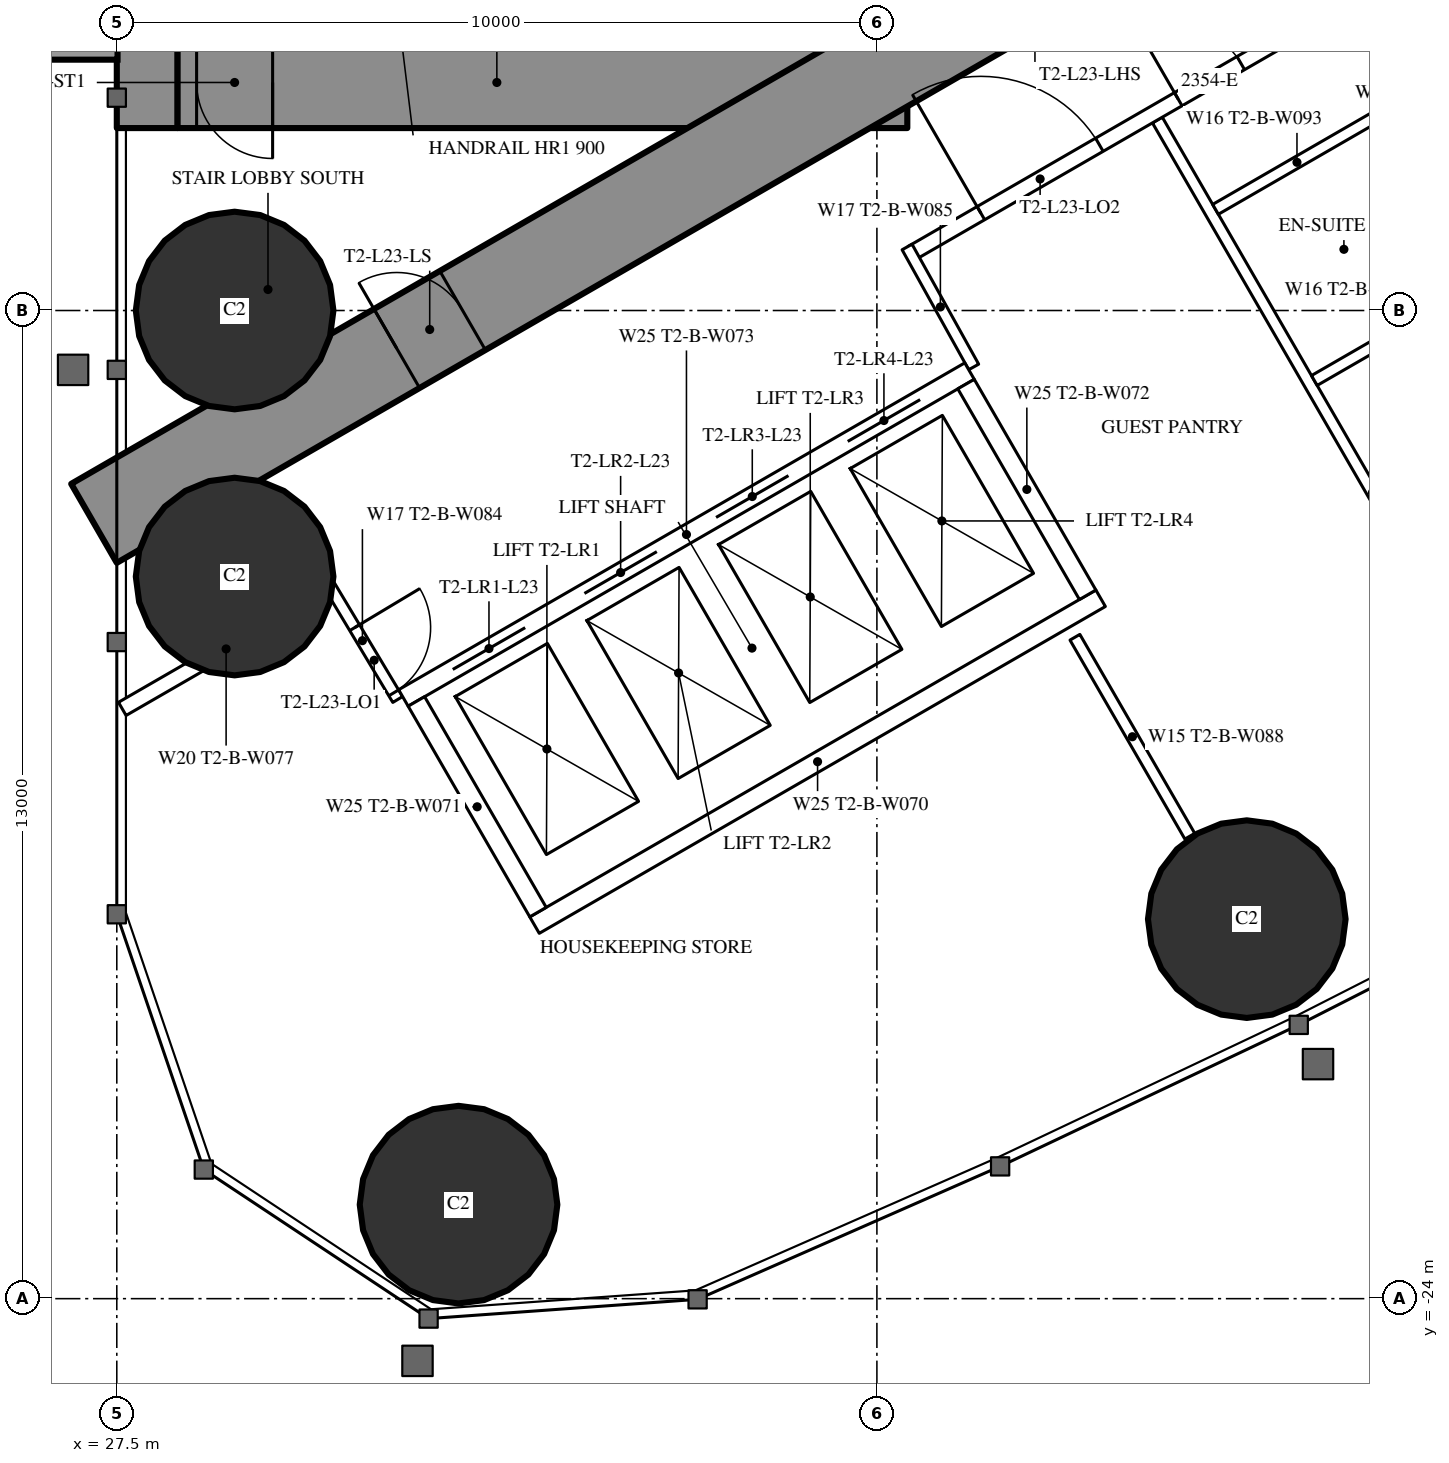
"""IFC4 building model, lengths in metres.
Left out: names, types, materials, properties, quantities, classifications, styles, units other than length and angle.
Written with IfcOpenShell. Run it as: python <this file> out.ifc"""

import sys

from ifc_helpers import new_model, si_unit, direction, frame, frame_2d, origin, origin_2d, place, context, subcontext, project, spatial, rectangle, hollow_circle, extrude, element, fill, save


model = new_model("IFC4")
c1 = context("Model", 3, precision=1e-05, world=origin(), true_north=direction((0.0, 1.0)))
c2 = subcontext(c1, "Body", "Model", "MODEL_VIEW")
j1 = project(units=[si_unit("LENGTHUNIT", "METRE"), si_unit("PLANEANGLEUNIT", "RADIAN")], contexts=[c1])
p1 = place(None, origin())
s1 = spatial("IfcSite", under=j1, at=p1, CompositionType="ELEMENT")
p2 = place(p1, origin())
s2 = spatial("IfcBuilding", under=s1, at=p2, CompositionType="ELEMENT")
p3 = place(p2, frame((0.0, 0.0, 90.6)))
s3 = spatial("IfcBuildingStorey", under=s2, at=p3, CompositionType="ELEMENT", Elevation=90.6)
for number, where, z_axis, x_axis in (
    (1, (31.996, -22.763, 0.0), (0.0, 0.0, 1.0), (1.0, 0.0, 0.0)),
    (2, (29.05, -11.0, 0.0), (0.0, 0.0, 1.0), (1.0, 0.0, 0.0)),
    (3, (29.05, -14.5, 0.0), (0.0, 0.0, 1.0), (1.0, 0.0, 0.0)),
    (4, (42.366, -19.007, 0.0), (0.0, 0.0, 1.0), (1.0, 0.0, 0.0)),
):
    element("IfcColumn", number, at=place(p3, frame(where, z_axis=z_axis, x_axis=x_axis)), inside=s3, PredefinedType="COLUMN", context=c2, shape_type="SweptSolid", body=[
        extrude(hollow_circle(Radius=1.3, WallThickness=0.1, at=origin_2d()), origin(), (0.0, 0.0, 1.0), 3.5),
    ])
p4 = place(p3, frame((27.9, -8.6, 0.0), z_axis=(0.0, 0.0, 1.0), x_axis=(0.0, 1.0, 0.0)))
e5 = element("IfcWall", 5, at=p4, inside=s3, PredefinedType="SHEAR", context=c2, shape_type="SweptSolid", body=[
    extrude(rectangle(XDim=17.2, YDim=0.8, at=frame_2d((8.6, 0.0))), origin(), (0.0, 0.0, 1.0), 3.5),
])
p5 = place(p4, frame((2.45, 0.0, 0.6)))
e6 = element("IfcOpeningElement", 6, at=p5, cuts=e5, PredefinedType="OPENING", context=c2, shape_type="SweptSolid", body=[
    extrude(rectangle(XDim=0.6, YDim=2.1, at=frame_2d((0.3, 1.05))), frame((0.0, 0.41, 0.0), z_axis=(0.0, -1.0, 0.0), x_axis=(1.0, 0.0, 0.0)), (0.0, 0.0, 1.0), 0.82),
])
p6 = place(p4, frame((14.15, 0.0, 0.6)))
e7 = element("IfcOpeningElement", 7, at=p6, cuts=e5, PredefinedType="OPENING", context=c2, shape_type="SweptSolid", body=[
    extrude(rectangle(XDim=0.6, YDim=2.1, at=frame_2d((0.3, 1.05))), frame((0.0, 0.41, 0.0), z_axis=(0.0, -1.0, 0.0), x_axis=(1.0, 0.0, 0.0)), (0.0, 0.0, 1.0), 0.82),
])
p7 = place(p3, frame((37.3, -8.6, 0.0), z_axis=(0.0, 0.0, 1.0), x_axis=(0.0, 1.0, 0.0)))
e8 = element("IfcWall", 8, at=p7, inside=s3, PredefinedType="SHEAR", context=c2, shape_type="SweptSolid", body=[
    extrude(rectangle(XDim=17.2, YDim=1.2, at=frame_2d((8.6, 0.0))), origin(), (0.0, 0.0, 1.0), 3.5),
])
p8 = place(p7, frame((7.7, 0.0, 0.0)))
e9 = element("IfcOpeningElement", 9, at=p8, cuts=e8, PredefinedType="OPENING", context=c2, shape_type="SweptSolid", body=[
    extrude(rectangle(XDim=1.8, YDim=2.2, at=frame_2d((0.9, 1.1))), frame((0.0, 0.61, 0.0), z_axis=(0.0, -1.0, 0.0), x_axis=(1.0, 0.0, 0.0)), (0.0, 0.0, 1.0), 1.22),
])
p9 = place(p3, frame((28.3, -8.0, 0.0), z_axis=(0.0, 0.0, 1.0), x_axis=(1.0, 0.0, 0.0)))
e10 = element("IfcWall", 10, at=p9, inside=s3, PredefinedType="SHEAR", context=c2, shape_type="SweptSolid", body=[
    extrude(rectangle(XDim=8.4, YDim=1.2, at=frame_2d((4.2, 0.0))), origin(), (0.0, 0.0, 1.0), 3.5),
])
p10 = place(p9, frame((0.25, 0.0, 0.0)))
e11 = element("IfcOpeningElement", 11, at=p10, cuts=e10, PredefinedType="OPENING", context=c2, shape_type="SweptSolid", body=[
    extrude(rectangle(XDim=1.0, YDim=2.2, at=frame_2d((0.5, 1.1))), frame((0.0, 0.61, 0.0), z_axis=(0.0, -1.0, 0.0), x_axis=(1.0, 0.0, 0.0)), (0.0, 0.0, 1.0), 1.22),
])
p11 = place(p3, frame((27.2, -13.8, 0.0), z_axis=(0.0, 0.0, 1.0), x_axis=(0.866027159892, 0.499996958321, 0.0)))
e12 = element("IfcWall", 12, at=p11, inside=s3, PredefinedType="SHEAR", context=c2, shape_type="SweptSolid", body=[
    extrude(rectangle(XDim=27.947, YDim=1.2, at=frame_2d((13.973, 0.0))), origin(), (0.0, 0.0, 1.0), 3.5),
])
p12 = place(p11, frame((4.6, 0.0, 0.0)))
e13 = element("IfcOpeningElement", 13, at=p12, cuts=e12, PredefinedType="OPENING", context=c2, shape_type="SweptSolid", body=[
    extrude(rectangle(XDim=1.0, YDim=2.2, at=frame_2d((0.5, 1.1))), frame((0.0, 0.61, 0.0), z_axis=(0.0, -1.0, 0.0), x_axis=(1.0, 0.0, 0.0)), (0.0, 0.0, 1.0), 1.22),
])
p13 = place(p11, frame((13.395, 0.0, 0.0)))
e14 = element("IfcOpeningElement", 14, at=p13, cuts=e12, PredefinedType="OPENING", context=c2, shape_type="SweptSolid", body=[
    extrude(rectangle(XDim=1.8, YDim=2.2, at=frame_2d((0.9, 1.1))), frame((0.0, 0.61, 0.0), z_axis=(0.0, -1.0, 0.0), x_axis=(1.0, 0.0, 0.0)), (0.0, 0.0, 1.0), 1.22),
])
p14 = place(p3, frame((41.19, -8.494, 0.0), z_axis=(0.0, 0.0, 1.0), x_axis=(0.49999258054, -0.866029687369, 0.0)))
e15 = element("IfcWall", 15, at=p14, inside=s3, PredefinedType="PARTITIONING", context=c2, shape_type="SweptSolid", body=[
    extrude(rectangle(XDim=11.318, YDim=0.15, at=frame_2d((5.659, 0.0))), origin(), (0.0, 0.0, 1.0), 3.25),
])
p15 = place(p3, frame((40.105, -15.299, 0.0), z_axis=(0.0, 0.0, 1.0), x_axis=(0.499978822259, -0.866037630414, 0.0)))
e16 = element("IfcWall", 16, at=p15, inside=s3, PredefinedType="PARTITIONING", context=c2, shape_type="SweptSolid", body=[
    extrude(rectangle(XDim=3.023, YDim=0.15, at=frame_2d((1.511, 0.0))), origin(), (0.0, 0.0, 1.0), 3.25),
])
p16 = place(p3, frame((27.572, -16.241, 0.0), z_axis=(0.0, 0.0, 1.0), x_axis=(0.866029654818, 0.499992636921, 0.0)))
e17 = element("IfcWall", 17, at=p16, inside=s3, PredefinedType="PARTITIONING", context=c2, shape_type="SweptSolid", body=[
    extrude(rectangle(XDim=3.155, YDim=0.2, at=frame_2d((1.577, 0.0))), origin(), (0.0, 0.0, 1.0), 3.25),
])
p17 = place(p3, frame((37.96, -10.243, 0.0), z_axis=(0.0, 0.0, 1.0), x_axis=(0.866026429433, 0.499998223521, 0.0)))
e18 = element("IfcWall", 18, at=p17, inside=s3, PredefinedType="PARTITIONING", context=c2, shape_type="SweptSolid", body=[
    extrude(rectangle(XDim=20.487, YDim=0.2, at=frame_2d((10.243, 0.0))), origin(), (0.0, 0.0, 1.0), 3.25),
])
p18 = place(p17, frame((4.047, 0.0, 0.0)))
e19 = element("IfcOpeningElement", 19, at=p18, cuts=e18, PredefinedType="OPENING", context=c2, shape_type="SweptSolid", body=[
    extrude(rectangle(XDim=0.95, YDim=2.2, at=frame_2d((0.475, 1.1))), frame((0.0, 0.11, 0.0), z_axis=(0.0, -1.0, 0.0), x_axis=(1.0, 0.0, 0.0)), (0.0, 0.0, 1.0), 0.22),
])
p19 = place(p17, frame((11.04, 0.0, 0.0)))
e20 = element("IfcOpeningElement", 20, at=p19, cuts=e18, PredefinedType="OPENING", context=c2, shape_type="SweptSolid", body=[
    extrude(rectangle(XDim=0.95, YDim=2.2, at=frame_2d((0.475, 1.1))), frame((0.0, 0.11, 0.0), z_axis=(0.0, -1.0, 0.0), x_axis=(1.0, 0.0, 0.0)), (0.0, 0.0, 1.0), 0.22),
])
p20 = place(p17, frame((13.035, 0.0, 0.0)))
e21 = element("IfcOpeningElement", 21, at=p20, cuts=e18, PredefinedType="OPENING", context=c2, shape_type="SweptSolid", body=[
    extrude(rectangle(XDim=0.95, YDim=2.2, at=frame_2d((0.475, 1.1))), frame((0.0, 0.11, 0.0), z_axis=(0.0, -1.0, 0.0), x_axis=(1.0, 0.0, 0.0)), (0.0, 0.0, 1.0), 0.22),
])
p21 = place(p17, frame((17.085, 0.0, 0.0)))
e22 = element("IfcOpeningElement", 22, at=p21, cuts=e18, PredefinedType="OPENING", context=c2, shape_type="SweptSolid", body=[
    extrude(rectangle(XDim=0.95, YDim=2.2, at=frame_2d((0.475, 1.1))), frame((0.0, 0.11, 0.0), z_axis=(0.0, -1.0, 0.0), x_axis=(1.0, 0.0, 0.0)), (0.0, 0.0, 1.0), 0.22),
])
p22 = place(p17, frame((1.048, 0.0, 0.0)))
e23 = element("IfcOpeningElement", 23, at=p22, cuts=e18, PredefinedType="OPENING", context=c2, shape_type="SweptSolid", body=[
    extrude(rectangle(XDim=1.8, YDim=2.2, at=frame_2d((0.9, 1.1))), frame((0.0, 0.11, 0.0), z_axis=(0.0, -1.0, 0.0), x_axis=(1.0, 0.0, 0.0)), (0.0, 0.0, 1.0), 0.22),
])
p23 = place(p3, frame((30.267, -14.569, 0.0), z_axis=(0.0, 0.0, 1.0), x_axis=(0.514336634837, -0.857588377991, 0.0)))
e24 = element("IfcWall", 24, at=p23, inside=s3, PredefinedType="PARTITIONING", context=c2, shape_type="SweptSolid", body=[
    extrude(rectangle(XDim=1.805, YDim=0.15, at=frame_2d((0.903, 0.0))), origin(), (0.0, 0.0, 1.0), 3.25),
])
p24 = place(p23, frame((0.703, 0.0, 0.0)))
e25 = element("IfcOpeningElement", 25, at=p24, cuts=e24, PredefinedType="OPENING", context=c2, shape_type="SweptSolid", body=[
    extrude(rectangle(XDim=1.0, YDim=2.2, at=frame_2d((0.5, 1.1))), frame((0.0, 0.085, 0.0), z_axis=(0.0, -1.0, 0.0), x_axis=(1.0, 0.0, 0.0)), (0.0, 0.0, 1.0), 0.17),
])
p25 = place(p3, frame((38.773, -11.742, 0.0), z_axis=(0.0, 0.0, 1.0), x_axis=(-0.485528096672, 0.8742210632, 0.0)))
e26 = element("IfcWall", 26, at=p25, inside=s3, PredefinedType="PARTITIONING", context=c2, shape_type="SweptSolid", body=[
    extrude(rectangle(XDim=1.805, YDim=0.15, at=frame_2d((0.903, 0.0))), origin(), (0.0, 0.0, 1.0), 3.25),
])
p26 = place(p3, frame((43.255, -11.921, 0.0), z_axis=(0.0, 0.0, 1.0), x_axis=(0.866006523861, 0.500032699561, 0.0)))
e27 = element("IfcWall", 27, at=p26, inside=s3, PredefinedType="PARTITIONING", context=c2, shape_type="SweptSolid", body=[
    extrude(rectangle(XDim=2.475, YDim=0.15, at=frame_2d((1.237, 0.0))), origin(), (0.0, 0.0, 1.0), 3.25),
])
p27 = place(p3, frame((44.033, -8.469, 0.0), z_axis=(0.0, 0.0, 1.0), x_axis=(0.500047596559, -0.865997922154, 0.0)))
e28 = element("IfcWall", 28, at=p27, inside=s3, PredefinedType="PARTITIONING", context=c2, shape_type="SweptSolid", body=[
    extrude(rectangle(XDim=2.6, YDim=0.15, at=frame_2d((1.3, 0.0))), origin(), (0.0, 0.0, 1.0), 3.25),
])
p28 = place(p27, frame((0.9, 0.0, 0.0)))
e29 = element("IfcOpeningElement", 29, at=p28, cuts=e28, PredefinedType="OPENING", context=c2, shape_type="SweptSolid", body=[
    extrude(rectangle(XDim=0.8, YDim=2.2, at=frame_2d((0.4, 1.1))), frame((0.0, 0.085, 0.0), z_axis=(0.0, -1.0, 0.0), x_axis=(1.0, 0.0, 0.0)), (0.0, 0.0, 1.0), 0.17),
])
p29 = place(p3, frame((41.955, -9.669, 0.0), z_axis=(0.0, 0.0, 1.0), x_axis=(0.866006523861, 0.500032699561, 0.0)))
e30 = element("IfcWall", 30, at=p29, inside=s3, PredefinedType="PARTITIONING", context=c2, shape_type="SweptSolid", body=[
    extrude(rectangle(XDim=2.475, YDim=0.15, at=frame_2d((1.237, 0.0))), origin(), (0.0, 0.0, 1.0), 3.25),
])
p30 = place(p3, frame((31.271, -16.097, 0.0), z_axis=(0.0, 0.0, 1.0), x_axis=(0.86604045752, 0.499973925258, 0.0)))
e31 = element("IfcWall", 31, at=p30, inside=s3, PredefinedType="PARTITIONING", context=c2, shape_type="SweptSolid", body=[
    extrude(rectangle(XDim=8.6, YDim=0.25, at=frame_2d((4.3, 0.0))), origin(), (0.0, 0.0, 1.0), 3.25),
])
p31 = place(p30, frame((0.75, 0.0, 0.0)))
e32 = element("IfcOpeningElement", 32, at=p31, cuts=e31, PredefinedType="OPENING", context=c2, shape_type="SweptSolid", body=[
    extrude(rectangle(XDim=1.1, YDim=2.2, at=frame_2d((0.55, 1.1))), frame((0.0, 0.135, 0.0), z_axis=(0.0, -1.0, 0.0), x_axis=(1.0, 0.0, 0.0)), (0.0, 0.0, 1.0), 0.27),
])
p32 = place(p30, frame((2.75, 0.0, 0.0)))
e33 = element("IfcOpeningElement", 33, at=p32, cuts=e31, PredefinedType="OPENING", context=c2, shape_type="SweptSolid", body=[
    extrude(rectangle(XDim=1.1, YDim=2.2, at=frame_2d((0.55, 1.1))), frame((0.0, 0.135, 0.0), z_axis=(0.0, -1.0, 0.0), x_axis=(1.0, 0.0, 0.0)), (0.0, 0.0, 1.0), 0.27),
])
p33 = place(p30, frame((4.75, 0.0, 0.0)))
e34 = element("IfcOpeningElement", 34, at=p33, cuts=e31, PredefinedType="OPENING", context=c2, shape_type="SweptSolid", body=[
    extrude(rectangle(XDim=1.1, YDim=2.2, at=frame_2d((0.55, 1.1))), frame((0.0, 0.135, 0.0), z_axis=(0.0, -1.0, 0.0), x_axis=(1.0, 0.0, 0.0)), (0.0, 0.0, 1.0), 0.27),
])
p34 = place(p30, frame((6.75, 0.0, 0.0)))
e35 = element("IfcOpeningElement", 35, at=p34, cuts=e31, PredefinedType="OPENING", context=c2, shape_type="SweptSolid", body=[
    extrude(rectangle(XDim=1.1, YDim=2.2, at=frame_2d((0.55, 1.1))), frame((0.0, 0.135, 0.0), z_axis=(0.0, -1.0, 0.0), x_axis=(1.0, 0.0, 0.0)), (0.0, 0.0, 1.0), 0.27),
])
p35 = place(p3, frame((32.996, -19.086, 0.0), z_axis=(0.0, 0.0, 1.0), x_axis=(0.866028165386, 0.499995216735, 0.0)))
e36 = element("IfcWall", 36, at=p35, inside=s3, PredefinedType="PARTITIONING", context=c2, shape_type="SweptSolid", body=[
    extrude(rectangle(XDim=8.6, YDim=0.25, at=frame_2d((4.3, 0.0))), origin(), (0.0, 0.0, 1.0), 3.25),
])
for number, where, z_axis, x_axis in (
    (37, (31.441, -16.143, 0.0), (0.0, 0.0, 1.0), (0.5, -0.866, 0.0)),
    (38, (38.673, -11.968, 0.0), (0.0, 0.0, 1.0), (0.5, -0.866, 0.0)),
):
    element("IfcWall", number, at=place(p3, frame(where, z_axis=z_axis, x_axis=x_axis)), inside=s3, PredefinedType="PARTITIONING", context=c2, shape_type="SweptSolid", body=[
        extrude(rectangle(XDim=3.201, YDim=0.25, at=frame_2d((1.6, 0.0))), origin(), (0.0, 0.0, 1.0), 3.25),
    ])
p36 = place(p18, origin())
e39 = element("IfcDoor", 39, at=p36, inside=s3, OperationType="SINGLE_SWING_LEFT", PredefinedType="DOOR", context=c2, shape_type="SweptSolid", body=[
    extrude(rectangle(XDim=0.95, YDim=2.2, at=frame_2d((0.475, 1.1))), frame((0.0, 0.025, 0.0), z_axis=(0.0, -1.0, 0.0), x_axis=(1.0, 0.0, 0.0)), (0.0, 0.0, 1.0), 0.05),
])
fill(e19, e39)
p37 = place(p24, origin())
e40 = element("IfcDoor", 40, at=p37, inside=s3, OperationType="SINGLE_SWING_LEFT", PredefinedType="DOOR", context=c2, shape_type="SweptSolid", body=[
    extrude(rectangle(XDim=1.0, YDim=2.2, at=frame_2d((0.5, 1.1))), frame((0.0, 0.025, 0.0), z_axis=(0.0, -1.0, 0.0), x_axis=(1.0, 0.0, 0.0)), (0.0, 0.0, 1.0), 0.05),
])
fill(e25, e40)
p38 = place(p22, origin())
e41 = element("IfcDoor", 41, at=p38, inside=s3, OperationType="DOUBLE_DOOR_SINGLE_SWING", PredefinedType="DOOR", context=c2, shape_type="SweptSolid", body=[
    extrude(rectangle(XDim=1.8, YDim=2.2, at=frame_2d((0.9, 1.1))), frame((0.0, 0.025, 0.0), z_axis=(0.0, -1.0, 0.0), x_axis=(1.0, 0.0, 0.0)), (0.0, 0.0, 1.0), 0.05),
])
fill(e23, e41)
p39 = place(p12, origin())
e42 = element("IfcDoor", 42, at=p39, inside=s3, OperationType="SINGLE_SWING_LEFT", PredefinedType="DOOR", context=c2, shape_type="SweptSolid", body=[
    extrude(rectangle(XDim=1.0, YDim=2.2, at=frame_2d((0.5, 1.1))), frame((0.0, 0.025, 0.0), z_axis=(0.0, -1.0, 0.0), x_axis=(1.0, 0.0, 0.0)), (0.0, 0.0, 1.0), 0.05),
])
fill(e13, e42)
p40 = place(p10, origin())
e43 = element("IfcDoor", 43, at=p40, inside=s3, OperationType="SINGLE_SWING_RIGHT", PredefinedType="DOOR", context=c2, shape_type="SweptSolid", body=[
    extrude(rectangle(XDim=1.0, YDim=2.2, at=frame_2d((0.5, 1.1))), frame((0.0, 0.025, 0.0), z_axis=(0.0, -1.0, 0.0), x_axis=(1.0, 0.0, 0.0)), (0.0, 0.0, 1.0), 0.05),
])
fill(e11, e43)
p41 = place(p31, origin())
e44 = element("IfcDoor", 44, at=p41, inside=s3, OperationType="DOUBLE_DOOR_SLIDING", PredefinedType="USERDEFINED", context=c2, shape_type="SweptSolid", body=[
    extrude(rectangle(XDim=1.1, YDim=2.2, at=frame_2d((0.55, 1.1))), frame((0.0, 0.025, 0.0), z_axis=(0.0, -1.0, 0.0), x_axis=(1.0, 0.0, 0.0)), (0.0, 0.0, 1.0), 0.05),
])
fill(e32, e44)
p42 = place(p32, origin())
e45 = element("IfcDoor", 45, at=p42, inside=s3, OperationType="DOUBLE_DOOR_SLIDING", PredefinedType="USERDEFINED", context=c2, shape_type="SweptSolid", body=[
    extrude(rectangle(XDim=1.1, YDim=2.2, at=frame_2d((0.55, 1.1))), frame((0.0, 0.025, 0.0), z_axis=(0.0, -1.0, 0.0), x_axis=(1.0, 0.0, 0.0)), (0.0, 0.0, 1.0), 0.05),
])
fill(e33, e45)
p43 = place(p33, origin())
e46 = element("IfcDoor", 46, at=p43, inside=s3, OperationType="DOUBLE_DOOR_SLIDING", PredefinedType="USERDEFINED", context=c2, shape_type="SweptSolid", body=[
    extrude(rectangle(XDim=1.1, YDim=2.2, at=frame_2d((0.55, 1.1))), frame((0.0, 0.025, 0.0), z_axis=(0.0, -1.0, 0.0), x_axis=(1.0, 0.0, 0.0)), (0.0, 0.0, 1.0), 0.05),
])
fill(e34, e46)
p44 = place(p34, origin())
e47 = element("IfcDoor", 47, at=p44, inside=s3, OperationType="DOUBLE_DOOR_SLIDING", PredefinedType="USERDEFINED", context=c2, shape_type="SweptSolid", body=[
    extrude(rectangle(XDim=1.1, YDim=2.2, at=frame_2d((0.55, 1.1))), frame((0.0, 0.025, 0.0), z_axis=(0.0, -1.0, 0.0), x_axis=(1.0, 0.0, 0.0)), (0.0, 0.0, 1.0), 0.05),
])
fill(e35, e47)
save(model, sys.argv[1])
